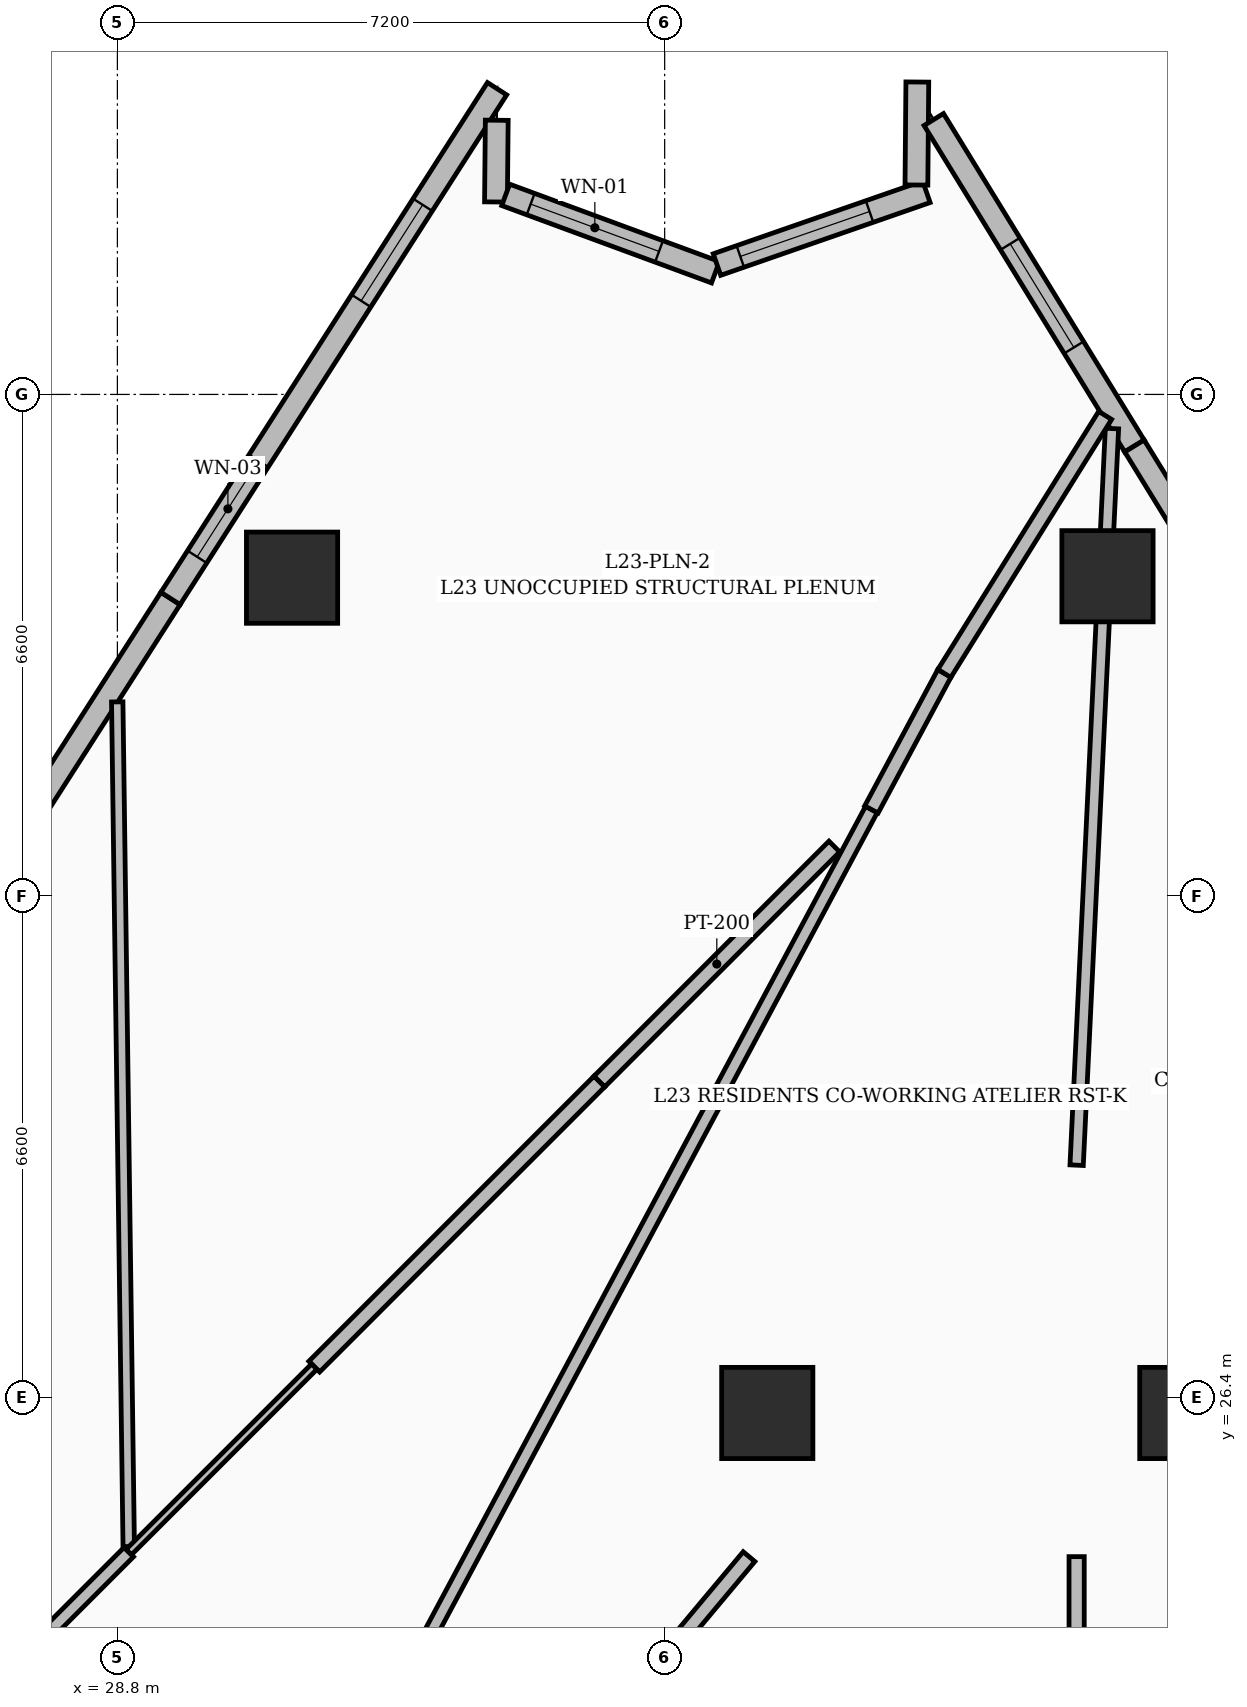
"""IFC4 building model, lengths in metres.
Left out: names, types, materials, properties, quantities, classifications, styles, units other than length and angle.
Written with IfcOpenShell. Run it as: python <this file> out.ifc"""

import sys

from ifc_helpers import new_model, si_unit, direction, frame, frame_2d, origin, origin_2d, place, context, subcontext, project, spatial, rectangle, extrude, element, fill, save


model = new_model("IFC4")
c1 = context("Model", 3, precision=1e-05, world=origin(), true_north=direction((0.0, 1.0)))
c2 = subcontext(c1, "Body", "Model", "MODEL_VIEW")
j1 = project(units=[si_unit("LENGTHUNIT", "METRE"), si_unit("PLANEANGLEUNIT", "RADIAN")], contexts=[c1])
p1 = place(None, origin())
s1 = spatial("IfcSite", under=j1, at=p1, CompositionType="ELEMENT")
p2 = place(p1, origin())
s2 = spatial("IfcBuilding", under=s1, at=p2, CompositionType="ELEMENT")
p3 = place(p2, frame((0.0, 0.0, 93.0)))
s3 = spatial("IfcBuildingStorey", under=s2, at=p3, CompositionType="ELEMENT", Elevation=93.0)
for number, where, z_axis, x_axis in (
    (1, (42.85, 26.2, 0.0), (0.0, 0.0, 1.0), (1.0, 0.0, 0.0)),
    (2, (37.35, 26.2, 0.0), (0.0, 0.0, 1.0), (1.0, 0.0, 0.0)),
    (3, (41.826, 37.208, 0.0), (0.0, 0.0, 1.0), (1.0, 0.0, 0.0)),
    (4, (31.098, 37.189, 0.0), (0.0, 0.0, 1.0), (1.0, 0.0, 0.0)),
):
    element("IfcColumn", number, at=place(p3, frame(where, z_axis=z_axis, x_axis=x_axis)), inside=s3, PredefinedType="COLUMN", context=c2, shape_type="SweptSolid", body=[
        extrude(rectangle(XDim=1.2, YDim=1.2, at=origin_2d()), origin(), (0.0, 0.0, 1.0), 3.6),
    ])
p4 = place(p3, frame((25.202, 30.21, 0.0), z_axis=(0.0, 0.0, 1.0), x_axis=(0.53945551692, 0.842014100395, 0.0)))
e5 = element("IfcWall", 5, at=p4, inside=s3, PredefinedType="SOLIDWALL", context=c2, shape_type="SweptSolid", body=[
    extrude(rectangle(XDim=7.964, YDim=0.3, at=frame_2d((3.982, 0.0))), origin(), (0.0, 0.0, 1.0), 3.35),
])
p5 = place(p4, frame((2.35, 0.0, 0.55)))
e6 = element("IfcOpeningElement", 6, at=p5, cuts=e5, PredefinedType="OPENING", context=c2, shape_type="SweptSolid", body=[
    extrude(rectangle(XDim=1.6, YDim=2.2, at=frame_2d((0.8, 1.1))), frame((0.0, 0.16, 0.0), z_axis=(0.0, -1.0, 0.0), x_axis=(1.0, 0.0, 0.0)), (0.0, 0.0, 1.0), 0.32),
])
p6 = place(p3, frame((29.499, 36.916, 0.0), z_axis=(0.0, 0.0, 1.0), x_axis=(0.539433782812, 0.842028024451, 0.0)))
e7 = element("IfcWall", 7, at=p6, inside=s3, PredefinedType="SOLIDWALL", context=c2, shape_type="SweptSolid", body=[
    extrude(rectangle(XDim=7.964, YDim=0.3, at=frame_2d((3.982, 0.0))), origin(), (0.0, 0.0, 1.0), 3.35),
])
p7 = place(p6, frame((0.65, 0.0, 0.6)))
e8 = element("IfcOpeningElement", 8, at=p7, cuts=e7, PredefinedType="OPENING", context=c2, shape_type="SweptSolid", body=[
    extrude(rectangle(XDim=1.5, YDim=2.1, at=frame_2d((0.75, 1.05))), frame((0.0, 0.16, 0.0), z_axis=(0.0, -1.0, 0.0), x_axis=(1.0, 0.0, 0.0)), (0.0, 0.0, 1.0), 0.32),
])
p8 = place(p6, frame((4.65, 0.0, 0.6)))
e9 = element("IfcOpeningElement", 9, at=p8, cuts=e7, PredefinedType="OPENING", context=c2, shape_type="SweptSolid", body=[
    extrude(rectangle(XDim=1.5, YDim=2.1, at=frame_2d((0.75, 1.05))), frame((0.0, 0.16, 0.0), z_axis=(0.0, -1.0, 0.0), x_axis=(1.0, 0.0, 0.0)), (0.0, 0.0, 1.0), 0.32),
])
p9 = place(p3, frame((33.791, 43.207, 0.0), z_axis=(0.0, 0.0, 1.0), x_axis=(-0.009538516763, -0.999954507314, 0.0)))
e10 = element("IfcWall", 10, at=p9, inside=s3, PredefinedType="SOLIDWALL", context=c2, shape_type="SweptSolid", body=[
    extrude(rectangle(XDim=1.075, YDim=0.3, at=frame_2d((0.538, 0.0))), origin(), (0.0, 0.0, 1.0), 3.35),
])
p10 = place(p3, frame((33.909, 42.225, 0.0), z_axis=(0.0, 0.0, 1.0), x_axis=(0.938225446259, -0.346024582931, 0.0)))
e11 = element("IfcWall", 11, at=p10, inside=s3, PredefinedType="SOLIDWALL", context=c2, shape_type="SweptSolid", body=[
    extrude(rectangle(XDim=2.941, YDim=0.3, at=frame_2d((1.471, 0.0))), origin(), (0.0, 0.0, 1.0), 3.35),
])
p11 = place(p10, frame((0.35, 0.0, 0.6)))
e12 = element("IfcOpeningElement", 12, at=p11, cuts=e11, PredefinedType="OPENING", context=c2, shape_type="SweptSolid", body=[
    extrude(rectangle(XDim=1.8, YDim=2.1, at=frame_2d((0.9, 1.05))), frame((0.0, 0.16, 0.0), z_axis=(0.0, -1.0, 0.0), x_axis=(1.0, 0.0, 0.0)), (0.0, 0.0, 1.0), 0.32),
])
p12 = place(p3, frame((36.688, 41.309, 0.0), z_axis=(0.0, 0.0, 1.0), x_axis=(0.944571305793, 0.328306332978, 0.0)))
e13 = element("IfcWall", 13, at=p12, inside=s3, PredefinedType="SOLIDWALL", context=c2, shape_type="SweptSolid", body=[
    extrude(rectangle(XDim=2.917, YDim=0.3, at=frame_2d((1.458, 0.0))), origin(), (0.0, 0.0, 1.0), 3.35),
])
p13 = place(p12, frame((0.325, 0.0, 0.6)))
e14 = element("IfcOpeningElement", 14, at=p13, cuts=e13, PredefinedType="OPENING", context=c2, shape_type="SweptSolid", body=[
    extrude(rectangle(XDim=1.8, YDim=2.1, at=frame_2d((0.9, 1.05))), frame((0.0, 0.16, 0.0), z_axis=(0.0, -1.0, 0.0), x_axis=(1.0, 0.0, 0.0)), (0.0, 0.0, 1.0), 0.32),
])
p14 = place(p3, frame((39.312, 42.355, 0.0), z_axis=(0.0, 0.0, 1.0), x_axis=(0.008828484753, 0.999961028169, 0.0)))
e15 = element("IfcWall", 15, at=p14, inside=s3, PredefinedType="SOLIDWALL", context=c2, shape_type="SweptSolid", body=[
    extrude(rectangle(XDim=1.355, YDim=0.3, at=frame_2d((0.677, 0.0))), origin(), (0.0, 0.0, 1.0), 3.35),
])
p15 = place(p3, frame((39.54, 43.217, 0.0), z_axis=(0.0, 0.0, 1.0), x_axis=(0.52373802156, -0.851879383935, 0.0)))
e16 = element("IfcWall", 16, at=p15, inside=s3, PredefinedType="SOLIDWALL", context=c2, shape_type="SweptSolid", body=[
    extrude(rectangle(XDim=5.042, YDim=0.3, at=frame_2d((2.521, 0.0))), origin(), (0.0, 0.0, 1.0), 3.35),
])
p16 = place(p15, frame((1.92, 0.0, 0.55)))
e17 = element("IfcOpeningElement", 17, at=p16, cuts=e16, PredefinedType="OPENING", context=c2, shape_type="SweptSolid", body=[
    extrude(rectangle(XDim=1.6, YDim=2.2, at=frame_2d((0.8, 1.1))), frame((0.0, 0.16, 0.0), z_axis=(0.0, -1.0, 0.0), x_axis=(1.0, 0.0, 0.0)), (0.0, 0.0, 1.0), 0.32),
])
p17 = place(p3, frame((42.181, 38.922, 0.0), z_axis=(0.0, 0.0, 1.0), x_axis=(0.523678708762, -0.851915846777, 0.0)))
e18 = element("IfcWall", 18, at=p17, inside=s3, PredefinedType="SOLIDWALL", context=c2, shape_type="SweptSolid", body=[
    extrude(rectangle(XDim=5.596, YDim=0.3, at=frame_2d((2.798, 0.0))), origin(), (0.0, 0.0, 1.0), 3.35),
])
p18 = place(p17, frame((2.025, 0.0, 0.6)))
e19 = element("IfcOpeningElement", 19, at=p18, cuts=e18, PredefinedType="OPENING", context=c2, shape_type="SweptSolid", body=[
    extrude(rectangle(XDim=1.5, YDim=2.1, at=frame_2d((0.75, 1.05))), frame((0.0, 0.16, 0.0), z_axis=(0.0, -1.0, 0.0), x_axis=(1.0, 0.0, 0.0)), (0.0, 0.0, 1.0), 0.32),
])
p19 = place(p3, frame((22.39, 17.81, 0.0), z_axis=(0.0, 0.0, 1.0), x_axis=(0.707093622896, 0.707119939232, 0.0)))
e20 = element("IfcWall", 20, at=p19, inside=s3, PredefinedType="PARTITIONING", context=c2, shape_type="SweptSolid", body=[
    extrude(rectangle(XDim=9.277, YDim=0.175, at=frame_2d((4.639, 0.0))), origin(), (0.0, 0.0, 1.0), 2.345),
])
p20 = place(p3, frame((28.949, 24.442, 0.0), z_axis=(0.0, 0.0, 1.0), x_axis=(-0.013598057178, 0.999907542146, 0.0)))
e21 = element("IfcWall", 21, at=p20, inside=s3, PredefinedType="PARTITIONING", context=c2, shape_type="SweptSolid", body=[
    extrude(rectangle(XDim=11.114, YDim=0.15, at=frame_2d((5.557, 0.0))), origin(), (0.0, 0.0, 1.0), 2.37),
])
p21 = place(p3, frame((29.99, 17.825, 0.0), z_axis=(0.0, 0.0, 1.0), x_axis=(0.471794438595, 0.881708573005, 0.0)))
e22 = element("IfcWall", 22, at=p21, inside=s3, PredefinedType="PARTITIONING", context=c2, shape_type="SweptSolid", body=[
    extrude(rectangle(XDim=18.504, YDim=0.175, at=frame_2d((9.252, 0.0))), origin(), (0.0, 0.0, 1.0), 2.345),
])
p22 = place(p3, frame((38.232, 33.652, 0.0), z_axis=(0.0, 0.0, 1.0), x_axis=(-0.707134695316, -0.707078865955, 0.0)))
e23 = element("IfcWall", 23, at=p22, inside=s3, PredefinedType="PARTITIONING", context=c2, shape_type="SweptSolid", body=[
    extrude(rectangle(XDim=4.373, YDim=0.2, at=frame_2d((2.187, 0.0))), origin(), (0.0, 0.0, 1.0), 2.787),
])
p23 = place(p3, frame((35.14, 30.56, 0.0), z_axis=(0.0, 0.0, 1.0), x_axis=(-0.707106781187, -0.707106781187, 0.0)))
e24 = element("IfcWall", 24, at=p23, inside=s3, PredefinedType="PARTITIONING", context=c2, shape_type="SweptSolid", body=[
    extrude(rectangle(XDim=5.303, YDim=0.2, at=frame_2d((2.652, 0.0))), origin(), (0.0, 0.0, 1.0), 2.345),
])
p24 = place(p3, frame((37.11, 24.31, 0.0), z_axis=(0.0, 0.0, 1.0), x_axis=(-0.641959412344, -0.766738620981, 0.0)))
e25 = element("IfcWall", 25, at=p24, inside=s3, PredefinedType="PARTITIONING", context=c2, shape_type="SweptSolid", body=[
    extrude(rectangle(XDim=4.987, YDim=0.2, at=frame_2d((2.494, 0.0))), origin(), (0.0, 0.0, 1.0), 2.309),
])
p25 = place(p3, frame((41.42, 19.998, 0.0), z_axis=(0.0, 0.0, 1.0), x_axis=(0.0, 1.0, 0.0)))
e26 = element("IfcWall", 26, at=p25, inside=s3, PredefinedType="PARTITIONING", context=c2, shape_type="SweptSolid", body=[
    extrude(rectangle(XDim=4.312, YDim=0.2, at=frame_2d((2.156, 0.0))), origin(), (0.0, 0.0, 1.0), 3.35),
])
p26 = place(p3, frame((41.42, 29.46, 0.0), z_axis=(0.0, 0.0, 1.0), x_axis=(0.047936966321, 0.998850362797, 0.0)))
e27 = element("IfcWall", 27, at=p26, inside=s3, PredefinedType="PARTITIONING", context=c2, shape_type="SweptSolid", body=[
    extrude(rectangle(XDim=9.702, YDim=0.175, at=frame_2d((4.851, 0.0))), origin(), (0.0, 0.0, 1.0), 2.345),
])
p27 = place(p3, frame((39.68, 35.93, 0.0), z_axis=(0.0, 0.0, 1.0), x_axis=(-0.472608279445, -0.881272610603, 0.0)))
e28 = element("IfcWall", 28, at=p27, inside=s3, PredefinedType="PARTITIONING", context=c2, shape_type="SweptSolid", body=[
    extrude(rectangle(XDim=2.031, YDim=0.2, at=frame_2d((1.016, 0.0))), origin(), (0.0, 0.0, 1.0), 3.35),
])
p28 = place(p3, frame((41.795, 39.324, 0.0), z_axis=(0.0, 0.0, 1.0), x_axis=(-0.528868032501, -0.848704073396, 0.0)))
e29 = element("IfcWall", 29, at=p28, inside=s3, PredefinedType="PARTITIONING", context=c2, shape_type="SweptSolid", body=[
    extrude(rectangle(XDim=3.999, YDim=0.2, at=frame_2d((2.0, 0.0))), origin(), (0.0, 0.0, 1.0), 2.37),
])
p29 = place(p3, frame((31.39, 26.81, 0.0), z_axis=(0.0, 0.0, 1.0), x_axis=(-0.707106781187, -0.707106781187, 0.0)))
e30 = element("IfcWall", 30, at=p29, inside=s3, PredefinedType="PARTITIONING", context=c2, shape_type="SweptSolid", body=[
    extrude(rectangle(XDim=3.451, YDim=0.1, at=frame_2d((1.725, 0.0))), origin(), (0.0, 0.0, 1.0), 2.345),
])
p30 = place(p7, origin())
e31 = element("IfcWindow", 31, at=p30, inside=s3, PartitioningType="SINGLE_PANEL", PredefinedType="WINDOW", context=c2, shape_type="SweptSolid", body=[
    extrude(rectangle(XDim=1.5, YDim=2.1, at=frame_2d((0.75, 1.05))), frame((0.0, 0.03, 0.0), z_axis=(0.0, -1.0, 0.0), x_axis=(1.0, 0.0, 0.0)), (0.0, 0.0, 1.0), 0.06),
])
fill(e8, e31)
p31 = place(p8, origin())
e32 = element("IfcWindow", 32, at=p31, inside=s3, PartitioningType="SINGLE_PANEL", PredefinedType="WINDOW", context=c2, shape_type="SweptSolid", body=[
    extrude(rectangle(XDim=1.5, YDim=2.1, at=frame_2d((0.75, 1.05))), frame((0.0, 0.03, 0.0), z_axis=(0.0, -1.0, 0.0), x_axis=(1.0, 0.0, 0.0)), (0.0, 0.0, 1.0), 0.06),
])
fill(e9, e32)
p32 = place(p11, origin())
e33 = element("IfcWindow", 33, at=p32, inside=s3, PartitioningType="SINGLE_PANEL", PredefinedType="WINDOW", context=c2, shape_type="SweptSolid", body=[
    extrude(rectangle(XDim=1.8, YDim=2.1, at=frame_2d((0.9, 1.05))), frame((0.0, 0.03, 0.0), z_axis=(0.0, -1.0, 0.0), x_axis=(1.0, 0.0, 0.0)), (0.0, 0.0, 1.0), 0.06),
])
fill(e12, e33)
p33 = place(p13, origin())
e34 = element("IfcWindow", 34, at=p33, inside=s3, PartitioningType="SINGLE_PANEL", PredefinedType="WINDOW", context=c2, shape_type="SweptSolid", body=[
    extrude(rectangle(XDim=1.8, YDim=2.1, at=frame_2d((0.9, 1.05))), frame((0.0, 0.03, 0.0), z_axis=(0.0, -1.0, 0.0), x_axis=(1.0, 0.0, 0.0)), (0.0, 0.0, 1.0), 0.06),
])
fill(e14, e34)
p34 = place(p16, origin())
e35 = element("IfcWindow", 35, at=p34, inside=s3, PartitioningType="SINGLE_PANEL", PredefinedType="WINDOW", context=c2, shape_type="SweptSolid", body=[
    extrude(rectangle(XDim=1.6, YDim=2.2, at=frame_2d((0.8, 1.1))), frame((0.0, 0.03, 0.0), z_axis=(0.0, -1.0, 0.0), x_axis=(1.0, 0.0, 0.0)), (0.0, 0.0, 1.0), 0.06),
])
fill(e17, e35)
save(model, sys.argv[1])
